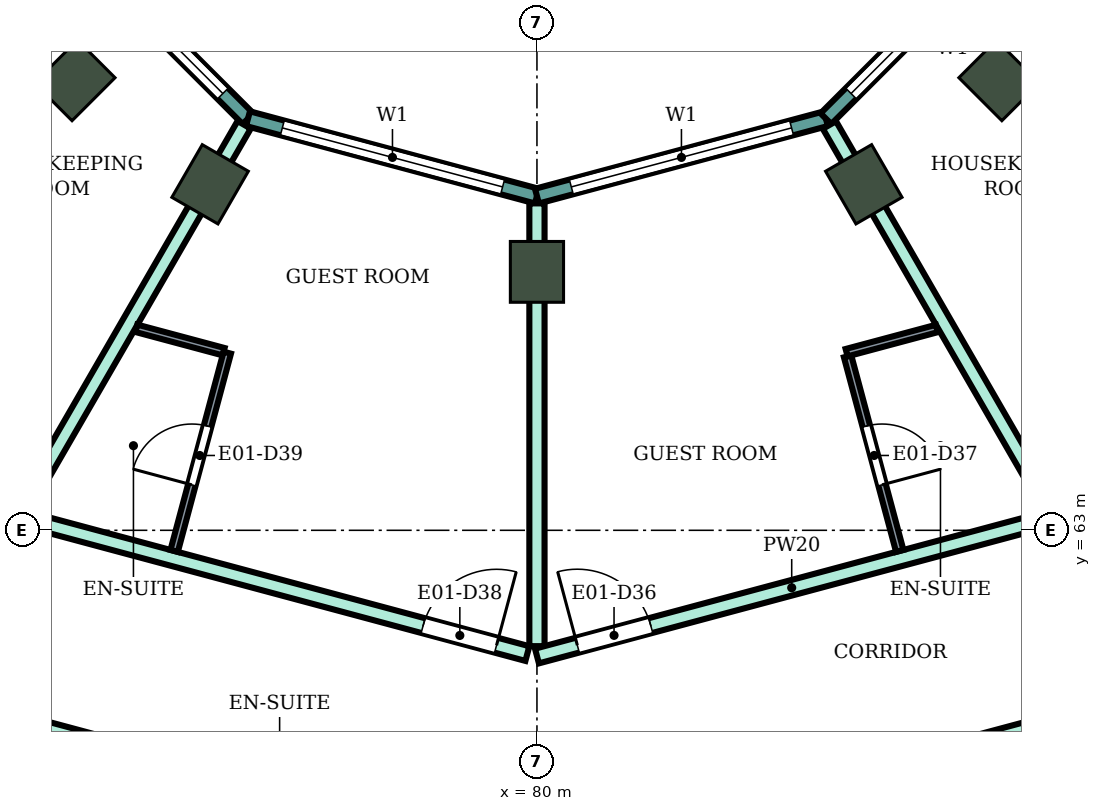
"""IFC4 building model, lengths in metres.
Left out: names, types, materials, properties, quantities, classifications, styles, units other than length and angle.
Written with IfcOpenShell. Run it as: python <this file> out.ifc"""

import sys

from ifc_helpers import new_model, si_unit, direction, frame, frame_2d, origin, origin_2d, place, context, subcontext, project, spatial, rectangle, extrude, element, fill, save


model = new_model("IFC4")
c1 = context("Model", 3, precision=1e-05, world=origin(), true_north=direction((0.0, 1.0)))
c2 = subcontext(c1, "Body", "Model", "MODEL_VIEW")
j1 = project(units=[si_unit("LENGTHUNIT", "METRE"), si_unit("PLANEANGLEUNIT", "RADIAN")], contexts=[c1])
p1 = place(None, origin())
s1 = spatial("IfcSite", under=j1, at=p1, CompositionType="ELEMENT")
p2 = place(p1, origin())
s2 = spatial("IfcBuilding", under=s1, at=p2, CompositionType="ELEMENT")
p3 = place(p2, frame((0.0, 0.0, 122.4)))
s3 = spatial("IfcBuildingStorey", under=s2, at=p3, CompositionType="ELEMENT", Elevation=122.4)
for number, where, z_axis, x_axis in (
    (1, (73.919, 68.919, 0.0), (0.0, 0.0, 1.0), (-0.707, -0.707, 0.0)),
    (2, (75.7, 67.552, 0.0), (0.0, 0.0, 1.0), (-0.5, -0.866, 0.0)),
    (3, (80.0, 66.4, 0.0), (0.0, 0.0, 1.0), (0.0, -1.0, 0.0)),
    (4, (84.3, 67.552, 0.0), (0.0, 0.0, 1.0), (0.5, -0.866, 0.0)),
    (5, (86.081, 68.919, 0.0), (0.0, 0.0, 1.0), (0.707, -0.707, 0.0)),
):
    element("IfcColumn", number, at=place(p3, frame(where, z_axis=z_axis, x_axis=x_axis)), inside=s3, PredefinedType="COLUMN", context=c2, shape_type="SweptSolid", body=[
        extrude(rectangle(XDim=0.8, YDim=0.7, at=origin_2d()), origin(), (0.0, 0.0, 1.0), 3.9),
    ])
p4 = place(p3, frame((73.415, 71.198, 0.0), z_axis=(0.0, 0.0, 1.0), x_axis=(0.707106781187, -0.707106781187, 0.0)))
e6 = element("IfcWall", 6, at=p4, inside=s3, PredefinedType="NOTDEFINED", context=c2, shape_type="SweptSolid", body=[
    extrude(rectangle(XDim=3.936, YDim=0.2, at=frame_2d((1.968, 0.0))), origin(), (0.0, 0.0, 1.0), 3.9),
])
p5 = place(p4, frame((0.468, 0.0, 0.9)))
e7 = element("IfcOpeningElement", 7, at=p5, cuts=e6, PredefinedType="OPENING", context=c2, shape_type="SweptSolid", body=[
    extrude(rectangle(XDim=3.0, YDim=2.3, at=frame_2d((1.5, 1.15))), frame((0.0, 0.11, 0.0), z_axis=(0.0, -1.0, 0.0), x_axis=(1.0, 0.0, 0.0)), (0.0, 0.0, 1.0), 0.22),
])
p6 = place(p3, frame((76.198, 68.415, 0.0), z_axis=(0.0, 0.0, 1.0), x_axis=(0.965933654434, -0.258789828301, 0.0)))
e8 = element("IfcWall", 8, at=p6, inside=s3, PredefinedType="NOTDEFINED", context=c2, shape_type="SweptSolid", body=[
    extrude(rectangle(XDim=3.936, YDim=0.2, at=frame_2d((1.968, 0.0))), origin(), (0.0, 0.0, 1.0), 3.9),
])
p7 = place(p6, frame((0.468, 0.0, 0.9)))
e9 = element("IfcOpeningElement", 9, at=p7, cuts=e8, PredefinedType="OPENING", context=c2, shape_type="SweptSolid", body=[
    extrude(rectangle(XDim=3.0, YDim=2.3, at=frame_2d((1.5, 1.15))), frame((0.0, 0.11, 0.0), z_axis=(0.0, -1.0, 0.0), x_axis=(1.0, 0.0, 0.0)), (0.0, 0.0, 1.0), 0.22),
])
p8 = place(p3, frame((80.0, 67.396, 0.0), z_axis=(0.0, 0.0, 1.0), x_axis=(0.965933654434, 0.258789828301, 0.0)))
e10 = element("IfcWall", 10, at=p8, inside=s3, PredefinedType="NOTDEFINED", context=c2, shape_type="SweptSolid", body=[
    extrude(rectangle(XDim=3.936, YDim=0.2, at=frame_2d((1.968, 0.0))), origin(), (0.0, 0.0, 1.0), 3.9),
])
p9 = place(p8, frame((0.468, 0.0, 0.9)))
e11 = element("IfcOpeningElement", 11, at=p9, cuts=e10, PredefinedType="OPENING", context=c2, shape_type="SweptSolid", body=[
    extrude(rectangle(XDim=3.0, YDim=2.3, at=frame_2d((1.5, 1.15))), frame((0.0, 0.11, 0.0), z_axis=(0.0, -1.0, 0.0), x_axis=(1.0, 0.0, 0.0)), (0.0, 0.0, 1.0), 0.22),
])
p10 = place(p3, frame((83.802, 68.415, 0.0), z_axis=(0.0, 0.0, 1.0), x_axis=(0.707106781187, 0.707106781187, 0.0)))
e12 = element("IfcWall", 12, at=p10, inside=s3, PredefinedType="NOTDEFINED", context=c2, shape_type="SweptSolid", body=[
    extrude(rectangle(XDim=3.936, YDim=0.2, at=frame_2d((1.968, 0.0))), origin(), (0.0, 0.0, 1.0), 3.9),
])
p11 = place(p10, frame((0.468, 0.0, 0.9)))
e13 = element("IfcOpeningElement", 13, at=p11, cuts=e12, PredefinedType="OPENING", context=c2, shape_type="SweptSolid", body=[
    extrude(rectangle(XDim=3.0, YDim=2.3, at=frame_2d((1.5, 1.15))), frame((0.0, 0.11, 0.0), z_axis=(0.0, -1.0, 0.0), x_axis=(1.0, 0.0, 0.0)), (0.0, 0.0, 1.0), 0.22),
])
p12 = place(p3, frame((71.877, 60.832, 0.0), z_axis=(0.0, 0.0, 1.0), x_axis=(0.965857276008, -0.259074742848, 0.0)))
e14 = element("IfcWall", 14, at=p12, inside=s3, PredefinedType="PARTITIONING", context=c2, shape_type="SweptSolid", body=[
    extrude(rectangle(XDim=8.36, YDim=0.2, at=frame_2d((4.18, 0.0))), origin(), (0.0, 0.0, 1.0), 3.45),
])
p13 = place(p12, frame((0.55, 0.0, 0.0)))
e15 = element("IfcOpeningElement", 15, at=p13, cuts=e14, PredefinedType="OPENING", context=c2, shape_type="SweptSolid", body=[
    extrude(rectangle(XDim=1.0, YDim=2.1, at=frame_2d((0.5, 1.05))), frame((0.0, 0.11, 0.0), z_axis=(0.0, -1.0, 0.0), x_axis=(1.0, 0.0, 0.0)), (0.0, 0.0, 1.0), 0.22),
])
p14 = place(p3, frame((73.297, 63.143, 0.0), z_axis=(0.0, 0.0, 1.0), x_axis=(0.965859030528, -0.25906820173, 0.0)))
e16 = element("IfcWall", 16, at=p14, inside=s3, PredefinedType="PARTITIONING", context=c2, shape_type="SweptSolid", body=[
    extrude(rectangle(XDim=6.81, YDim=0.2, at=frame_2d((3.405, 0.0))), origin(), (0.0, 0.0, 1.0), 3.45),
])
p15 = place(p14, frame((5.39, 0.0, 0.0)))
e17 = element("IfcOpeningElement", 17, at=p15, cuts=e16, PredefinedType="OPENING", context=c2, shape_type="SweptSolid", body=[
    extrude(rectangle(XDim=1.0, YDim=2.1, at=frame_2d((0.5, 1.05))), frame((0.0, 0.11, 0.0), z_axis=(0.0, -1.0, 0.0), x_axis=(1.0, 0.0, 0.0)), (0.0, 0.0, 1.0), 0.22),
])
p16 = place(p3, frame((73.169, 63.178, 0.0), z_axis=(0.0, 0.0, 1.0), x_axis=(0.500239348149, 0.865887171959, 0.0)))
e18 = element("IfcWall", 18, at=p16, inside=s3, PredefinedType="PARTITIONING", context=c2, shape_type="SweptSolid", body=[
    extrude(rectangle(XDim=5.955, YDim=0.2, at=frame_2d((2.978, 0.0))), origin(), (0.0, 0.0, 1.0), 3.45),
])
p17 = place(p3, frame((80.0, 58.655, 0.0), z_axis=(0.0, 0.0, 1.0), x_axis=(0.965967338894, 0.258664068224, 0.0)))
e19 = element("IfcWall", 19, at=p17, inside=s3, PredefinedType="PARTITIONING", context=c2, shape_type="SweptSolid", body=[
    extrude(rectangle(XDim=8.36, YDim=0.2, at=frame_2d((4.18, 0.0))), origin(), (0.0, 0.0, 1.0), 3.45),
])
p18 = place(p17, frame((6.86, 0.0, 0.0)))
e20 = element("IfcOpeningElement", 20, at=p18, cuts=e19, PredefinedType="OPENING", context=c2, shape_type="SweptSolid", body=[
    extrude(rectangle(XDim=1.0, YDim=2.1, at=frame_2d((0.5, 1.05))), frame((0.0, 0.11, 0.0), z_axis=(0.0, -1.0, 0.0), x_axis=(1.0, 0.0, 0.0)), (0.0, 0.0, 1.0), 0.22),
])
p19 = place(p17, frame((2.7, 0.0, 0.0)))
e21 = element("IfcOpeningElement", 21, at=p19, cuts=e19, PredefinedType="OPENING", context=c2, shape_type="SweptSolid", body=[
    extrude(rectangle(XDim=1.0, YDim=2.1, at=frame_2d((0.5, 1.05))), frame((0.0, 0.11, 0.0), z_axis=(0.0, -1.0, 0.0), x_axis=(1.0, 0.0, 0.0)), (0.0, 0.0, 1.0), 0.22),
])
p20 = place(p3, frame((80.0, 61.476, 0.0), z_axis=(0.0, 0.0, 1.0), x_axis=(0.0, 1.0, 0.0)))
e22 = element("IfcWall", 22, at=p20, inside=s3, PredefinedType="PARTITIONING", context=c2, shape_type="SweptSolid", body=[
    extrude(rectangle(XDim=5.825, YDim=0.2, at=frame_2d((2.913, 0.0))), origin(), (0.0, 0.0, 1.0), 3.45),
])
p21 = place(p3, frame((80.0, 61.346, 0.0), z_axis=(0.0, 0.0, 1.0), x_axis=(0.965924181808, 0.258825182312, 0.0)))
e23 = element("IfcWall", 23, at=p21, inside=s3, PredefinedType="PARTITIONING", context=c2, shape_type="SweptSolid", body=[
    extrude(rectangle(XDim=6.94, YDim=0.2, at=frame_2d((3.47, 0.0))), origin(), (0.0, 0.0, 1.0), 3.45),
])
p22 = place(p21, frame((0.55, 0.0, 0.0)))
e24 = element("IfcOpeningElement", 24, at=p22, cuts=e23, PredefinedType="OPENING", context=c2, shape_type="SweptSolid", body=[
    extrude(rectangle(XDim=1.0, YDim=2.1, at=frame_2d((0.5, 1.05))), frame((0.0, 0.11, 0.0), z_axis=(0.0, -1.0, 0.0), x_axis=(1.0, 0.0, 0.0)), (0.0, 0.0, 1.0), 0.22),
])
p23 = place(p3, frame((83.848, 68.332, 0.0), z_axis=(0.0, 0.0, 1.0), x_axis=(0.499933000352, -0.866064082594, 0.0)))
e25 = element("IfcWall", 25, at=p23, inside=s3, PredefinedType="PARTITIONING", context=c2, shape_type="SweptSolid", body=[
    extrude(rectangle(XDim=5.855, YDim=0.2, at=frame_2d((2.928, 0.0))), origin(), (0.0, 0.0, 1.0), 3.45),
])
p24 = place(p3, frame((74.729, 65.657, 0.0), z_axis=(0.0, 0.0, 1.0), x_axis=(0.965948051503, -0.258736085224, 0.0)))
e26 = element("IfcWall", 26, at=p24, inside=s3, PredefinedType="PARTITIONING", context=c2, shape_type="SweptSolid", body=[
    extrude(rectangle(XDim=1.189, YDim=0.1, at=frame_2d((0.594, 0.0))), origin(), (0.0, 0.0, 1.0), 3.45),
])
p25 = place(p3, frame((75.227, 62.729, 0.0), z_axis=(0.0, 0.0, 1.0), x_axis=(0.258945475746, 0.965891940432, 0.0)))
e27 = element("IfcWall", 27, at=p25, inside=s3, PredefinedType="PARTITIONING", context=c2, shape_type="SweptSolid", body=[
    extrude(rectangle(XDim=2.7, YDim=0.1, at=frame_2d((1.35, 0.0))), origin(), (0.0, 0.0, 1.0), 3.45),
])
p26 = place(p25, frame((0.9, 0.0, 0.0)))
e28 = element("IfcOpeningElement", 28, at=p26, cuts=e27, PredefinedType="OPENING", context=c2, shape_type="SweptSolid", body=[
    extrude(rectangle(XDim=0.8, YDim=2.1, at=frame_2d((0.4, 1.05))), frame((0.0, 0.06, 0.0), z_axis=(0.0, -1.0, 0.0), x_axis=(1.0, 0.0, 0.0)), (0.0, 0.0, 1.0), 0.12),
])
p27 = place(p3, frame((84.087, 65.289, 0.0), z_axis=(0.0, 0.0, 1.0), x_axis=(0.258929459649, -0.965896234037, 0.0)))
e29 = element("IfcWall", 29, at=p27, inside=s3, PredefinedType="PARTITIONING", context=c2, shape_type="SweptSolid", body=[
    extrude(rectangle(XDim=2.65, YDim=0.1, at=frame_2d((1.325, 0.0))), origin(), (0.0, 0.0, 1.0), 3.45),
])
p28 = place(p27, frame((0.95, 0.0, 0.0)))
e30 = element("IfcOpeningElement", 30, at=p28, cuts=e29, PredefinedType="OPENING", context=c2, shape_type="SweptSolid", body=[
    extrude(rectangle(XDim=0.8, YDim=2.1, at=frame_2d((0.4, 1.05))), frame((0.0, 0.06, 0.0), z_axis=(0.0, -1.0, 0.0), x_axis=(1.0, 0.0, 0.0)), (0.0, 0.0, 1.0), 0.12),
])
p29 = place(p3, frame((84.074, 65.337, 0.0), z_axis=(0.0, 0.0, 1.0), x_axis=(0.965914351064, 0.258861867428, 0.0)))
e31 = element("IfcWall", 31, at=p29, inside=s3, PredefinedType="PARTITIONING", context=c2, shape_type="SweptSolid", body=[
    extrude(rectangle(XDim=1.229, YDim=0.1, at=frame_2d((0.615, 0.0))), origin(), (0.0, 0.0, 1.0), 3.45),
])
p30 = place(p5, origin())
e32 = element("IfcWindow", 32, at=p30, inside=s3, PartitioningType="SINGLE_PANEL", PredefinedType="WINDOW", context=c2, shape_type="SweptSolid", body=[
    extrude(rectangle(XDim=3.0, YDim=2.3, at=frame_2d((1.5, 1.15))), frame((0.0, 0.03, 0.0), z_axis=(0.0, -1.0, 0.0), x_axis=(1.0, 0.0, 0.0)), (0.0, 0.0, 1.0), 0.06),
])
fill(e7, e32)
p31 = place(p7, origin())
e33 = element("IfcWindow", 33, at=p31, inside=s3, PartitioningType="SINGLE_PANEL", PredefinedType="WINDOW", context=c2, shape_type="SweptSolid", body=[
    extrude(rectangle(XDim=3.0, YDim=2.3, at=frame_2d((1.5, 1.15))), frame((0.0, 0.03, 0.0), z_axis=(0.0, -1.0, 0.0), x_axis=(1.0, 0.0, 0.0)), (0.0, 0.0, 1.0), 0.06),
])
fill(e9, e33)
p32 = place(p9, origin())
e34 = element("IfcWindow", 34, at=p32, inside=s3, PartitioningType="SINGLE_PANEL", PredefinedType="WINDOW", context=c2, shape_type="SweptSolid", body=[
    extrude(rectangle(XDim=3.0, YDim=2.3, at=frame_2d((1.5, 1.15))), frame((0.0, 0.03, 0.0), z_axis=(0.0, -1.0, 0.0), x_axis=(1.0, 0.0, 0.0)), (0.0, 0.0, 1.0), 0.06),
])
fill(e11, e34)
p33 = place(p11, origin())
e35 = element("IfcWindow", 35, at=p33, inside=s3, PartitioningType="SINGLE_PANEL", PredefinedType="WINDOW", context=c2, shape_type="SweptSolid", body=[
    extrude(rectangle(XDim=3.0, YDim=2.3, at=frame_2d((1.5, 1.15))), frame((0.0, 0.03, 0.0), z_axis=(0.0, -1.0, 0.0), x_axis=(1.0, 0.0, 0.0)), (0.0, 0.0, 1.0), 0.06),
])
fill(e13, e35)
p34 = place(p22, origin())
e36 = element("IfcDoor", 36, at=p34, inside=s3, OperationType="SINGLE_SWING_LEFT", PredefinedType="DOOR", context=c2, shape_type="SweptSolid", body=[
    extrude(rectangle(XDim=1.0, YDim=2.1, at=frame_2d((0.5, 1.05))), frame((0.0, 0.025, 0.0), z_axis=(0.0, -1.0, 0.0), x_axis=(1.0, 0.0, 0.0)), (0.0, 0.0, 1.0), 0.05),
])
fill(e24, e36)
p35 = place(p28, origin())
e37 = element("IfcDoor", 37, at=p35, inside=s3, OperationType="SINGLE_SWING_RIGHT", PredefinedType="DOOR", context=c2, shape_type="SweptSolid", body=[
    extrude(rectangle(XDim=0.8, YDim=2.1, at=frame_2d((0.4, 1.05))), frame((0.0, 0.025, 0.0), z_axis=(0.0, -1.0, 0.0), x_axis=(1.0, 0.0, 0.0)), (0.0, 0.0, 1.0), 0.05),
])
fill(e30, e37)
p36 = place(p15, origin())
e38 = element("IfcDoor", 38, at=p36, inside=s3, OperationType="SINGLE_SWING_RIGHT", PredefinedType="DOOR", context=c2, shape_type="SweptSolid", body=[
    extrude(rectangle(XDim=1.0, YDim=2.1, at=frame_2d((0.5, 1.05))), frame((0.0, 0.025, 0.0), z_axis=(0.0, -1.0, 0.0), x_axis=(1.0, 0.0, 0.0)), (0.0, 0.0, 1.0), 0.05),
])
fill(e17, e38)
p37 = place(p26, origin())
e39 = element("IfcDoor", 39, at=p37, inside=s3, OperationType="SINGLE_SWING_LEFT", PredefinedType="DOOR", context=c2, shape_type="SweptSolid", body=[
    extrude(rectangle(XDim=0.8, YDim=2.1, at=frame_2d((0.4, 1.05))), frame((0.0, 0.025, 0.0), z_axis=(0.0, -1.0, 0.0), x_axis=(1.0, 0.0, 0.0)), (0.0, 0.0, 1.0), 0.05),
])
fill(e28, e39)
save(model, sys.argv[1])
